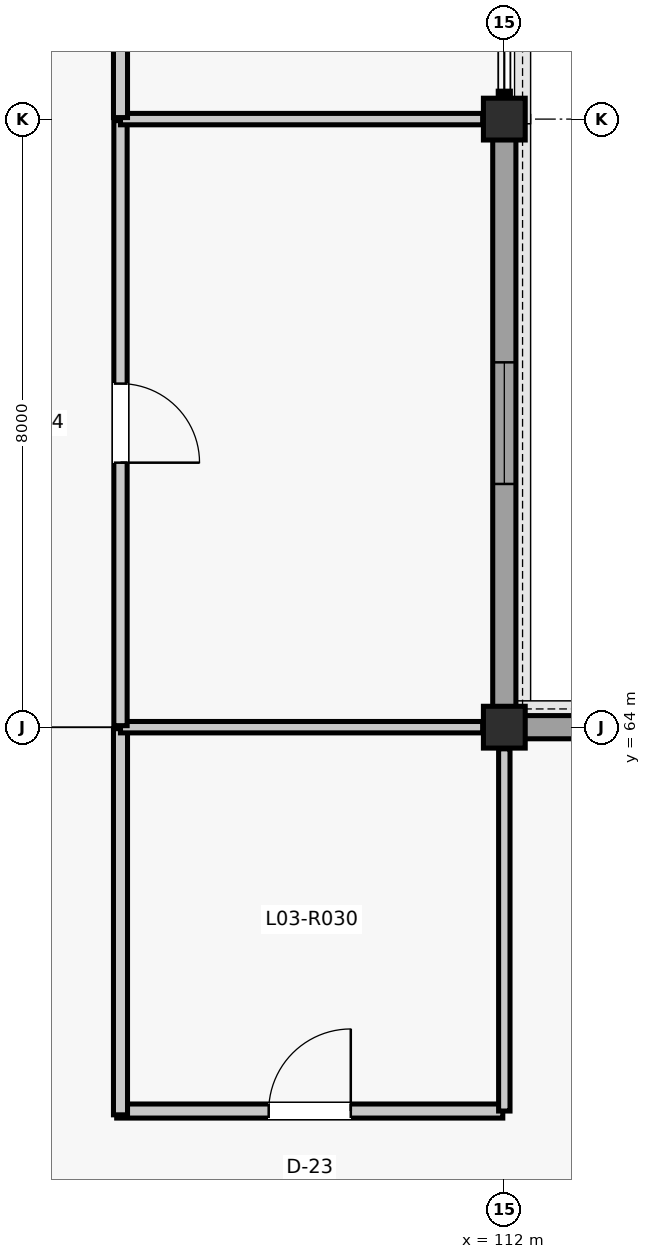
"""IFC4 building model, lengths in metres.
Left out: names, types, materials, properties, quantities, classifications, styles, units other than length and angle.
Written with IfcOpenShell. Run it as: python <this file> out.ifc"""

import sys

from ifc_helpers import new_model, si_unit, direction, frame, frame_2d, origin, origin_2d, place, context, subcontext, project, spatial, rectangle, extrude, element, fill, save


model = new_model("IFC4")
c1 = context("Model", 3, precision=1e-05, world=origin(), true_north=direction((0.0, 1.0)))
c2 = subcontext(c1, "Body", "Model", "MODEL_VIEW")
j1 = project(units=[si_unit("LENGTHUNIT", "METRE"), si_unit("PLANEANGLEUNIT", "RADIAN")], contexts=[c1])
p1 = place(None, origin())
s1 = spatial("IfcSite", under=j1, at=p1, CompositionType="ELEMENT")
p2 = place(p1, origin())
s2 = spatial("IfcBuilding", under=s1, at=p2, CompositionType="ELEMENT")
p3 = place(p2, frame((0.0, 0.0, 13.86)))
s3 = spatial("IfcBuildingStorey", under=s2, at=p3, CompositionType="ELEMENT", Elevation=13.86)
for number, where, z_axis, x_axis in (
    (1, (112.0, 64.0, 0.0), (0.0, 0.0, 1.0), (1.0, 0.0, 0.0)),
    (2, (112.0, 72.0, 0.0), (0.0, 0.0, 1.0), (1.0, 0.0, 0.0)),
):
    element("IfcColumn", number, at=place(p3, frame(where, z_axis=z_axis, x_axis=x_axis)), inside=s3, PredefinedType="COLUMN", context=c2, shape_type="SweptSolid", body=[
        extrude(rectangle(XDim=0.55, YDim=0.55, at=origin_2d()), origin(), (0.0, 0.0, 1.0), 3.96),
    ])
p4 = place(p3, frame((112.0, 64.26, 0.0), z_axis=(0.0, 0.0, 1.0), x_axis=(0.0, 1.0, 0.0)))
e3 = element("IfcWall", 3, at=p4, inside=s3, PredefinedType="SOLIDWALL", context=c2, shape_type="SweptSolid", body=[
    extrude(rectangle(XDim=7.48, YDim=0.305, at=frame_2d((3.74, 0.0))), origin(), (0.0, 0.0, 1.0), 3.364),
])
p5 = place(p4, frame((2.94, 0.0, 0.9)))
e4 = element("IfcOpeningElement", 4, at=p5, cuts=e3, PredefinedType="OPENING", context=c2, shape_type="SweptSolid", body=[
    extrude(rectangle(XDim=1.6, YDim=2.0, at=frame_2d((0.8, 1.0))), frame((0.0, 0.162, 0.0), z_axis=(0.0, -1.0, 0.0), x_axis=(1.0, 0.0, 0.0)), (0.0, 0.0, 1.0), 0.325),
])
p6 = place(p3, frame((112.26, 64.0, 0.0), z_axis=(0.0, 0.0, 1.0), x_axis=(1.0, 0.0, 0.0)))
e5 = element("IfcWall", 5, at=p6, inside=s3, PredefinedType="SOLIDWALL", context=c2, shape_type="SweptSolid", body=[
    extrude(rectangle(XDim=7.48, YDim=0.305, at=frame_2d((3.74, 0.0))), origin(), (0.0, 0.0, 1.0), 3.364),
])
p7 = place(p6, frame((0.746, 0.0, 0.95)))
e6 = element("IfcOpeningElement", 6, at=p7, cuts=e5, PredefinedType="OPENING", context=c2, shape_type="SweptSolid", body=[
    extrude(rectangle(XDim=1.2, YDim=1.8, at=frame_2d((0.6, 0.9))), frame((0.0, 0.162, 0.0), z_axis=(0.0, -1.0, 0.0), x_axis=(1.0, 0.0, 0.0)), (0.0, 0.0, 1.0), 0.325),
])
p8 = place(p6, frame((5.534, 0.0, 0.95)))
e7 = element("IfcOpeningElement", 7, at=p8, cuts=e5, PredefinedType="OPENING", context=c2, shape_type="SweptSolid", body=[
    extrude(rectangle(XDim=1.2, YDim=1.8, at=frame_2d((0.6, 0.9))), frame((0.0, 0.162, 0.0), z_axis=(0.0, -1.0, 0.0), x_axis=(1.0, 0.0, 0.0)), (0.0, 0.0, 1.0), 0.325),
])
p9 = place(p3, frame((106.9, 58.95, 0.0), z_axis=(0.0, 0.0, 1.0), x_axis=(1.0, 0.0, 0.0)))
e8 = element("IfcWall", 8, at=p9, inside=s3, PredefinedType="PARTITIONING", context=c2, shape_type="SweptSolid", body=[
    extrude(rectangle(XDim=5.08, YDim=0.185, at=frame_2d((2.54, 0.0))), origin(), (0.0, 0.0, 1.0), 3.247),
])
p10 = place(p9, frame((2.0, 0.0, 0.0)))
e9 = element("IfcOpeningElement", 9, at=p10, cuts=e8, PredefinedType="OPENING", context=c2, shape_type="SweptSolid", body=[
    extrude(rectangle(XDim=1.08, YDim=2.2, at=frame_2d((0.54, 1.1))), frame((0.0, 0.103, 0.0), z_axis=(0.0, -1.0, 0.0), x_axis=(1.0, 0.0, 0.0)), (0.0, 0.0, 1.0), 0.205),
])
p11 = place(p3, frame((106.95, 58.9, 0.0), z_axis=(0.0, 0.0, 1.0), x_axis=(0.0, 1.0, 0.0)))
e10 = element("IfcWall", 10, at=p11, inside=s3, PredefinedType="PARTITIONING", context=c2, shape_type="SweptSolid", body=[
    extrude(rectangle(XDim=5.08, YDim=0.185, at=frame_2d((2.54, 0.0))), origin(), (0.0, 0.0, 1.0), 3.253),
])
p12 = place(p3, frame((106.95, 64.0, 0.0), z_axis=(0.0, 0.0, 1.0), x_axis=(1.0, 0.0, 0.0)))
e11 = element("IfcWall", 11, at=p12, inside=s3, PredefinedType="PARTITIONING", context=c2, shape_type="SweptSolid", body=[
    extrude(rectangle(XDim=4.765, YDim=0.15, at=frame_2d((2.383, 0.0))), origin(), (0.0, 0.0, 1.0), 3.253),
])
p13 = place(p3, frame((112.0, 58.95, 0.0), z_axis=(0.0, 0.0, 1.0), x_axis=(0.0, 1.0, 0.0)))
e12 = element("IfcWall", 12, at=p13, inside=s3, PredefinedType="PARTITIONING", context=c2, shape_type="SweptSolid", body=[
    extrude(rectangle(XDim=4.765, YDim=0.15, at=frame_2d((2.383, 0.0))), origin(), (0.0, 0.0, 1.0), 3.247),
])
p14 = place(p3, frame((106.95, 64.02, 0.0), z_axis=(0.0, 0.0, 1.0), x_axis=(0.0, 1.0, 0.0)))
e13 = element("IfcWall", 13, at=p14, inside=s3, PredefinedType="PARTITIONING", context=c2, shape_type="SweptSolid", body=[
    extrude(rectangle(XDim=7.96, YDim=0.175, at=frame_2d((3.98, 0.0))), origin(), (0.0, 0.0, 1.0), 3.241),
])
p15 = place(p14, frame((3.46, 0.0, 0.0)))
e14 = element("IfcOpeningElement", 14, at=p15, cuts=e13, PredefinedType="OPENING", context=c2, shape_type="SweptSolid", body=[
    extrude(rectangle(XDim=1.04, YDim=2.18, at=frame_2d((0.52, 1.09))), frame((0.0, 0.097, 0.0), z_axis=(0.0, -1.0, 0.0), x_axis=(1.0, 0.0, 0.0)), (0.0, 0.0, 1.0), 0.195),
])
p16 = place(p3, frame((106.95, 72.0, 0.0), z_axis=(0.0, 0.0, 1.0), x_axis=(1.0, 0.0, 0.0)))
e15 = element("IfcWall", 15, at=p16, inside=s3, PredefinedType="PARTITIONING", context=c2, shape_type="SweptSolid", body=[
    extrude(rectangle(XDim=4.765, YDim=0.15, at=frame_2d((2.383, 0.0))), origin(), (0.0, 0.0, 1.0), 3.241),
])
p17 = place(p3, frame((106.95, 72.02, 0.0), z_axis=(0.0, 0.0, 1.0), x_axis=(0.0, 1.0, 0.0)))
e16 = element("IfcWall", 16, at=p17, inside=s3, PredefinedType="PARTITIONING", context=c2, shape_type="SweptSolid", body=[
    extrude(rectangle(XDim=7.96, YDim=0.185, at=frame_2d((3.98, 0.0))), origin(), (0.0, 0.0, 1.0), 3.241),
])
p18 = place(p17, frame((3.5, 0.0, 0.0)))
e17 = element("IfcOpeningElement", 17, at=p18, cuts=e16, PredefinedType="OPENING", context=c2, shape_type="SweptSolid", body=[
    extrude(rectangle(XDim=0.96, YDim=2.14, at=frame_2d((0.48, 1.07))), frame((0.0, 0.103, 0.0), z_axis=(0.0, -1.0, 0.0), x_axis=(1.0, 0.0, 0.0)), (0.0, 0.0, 1.0), 0.205),
])
p19 = place(p5, origin())
e18 = element("IfcWindow", 18, at=p19, inside=s3, PartitioningType="SINGLE_PANEL", PredefinedType="WINDOW", context=c2, shape_type="SweptSolid", body=[
    extrude(rectangle(XDim=1.6, YDim=2.0, at=frame_2d((0.8, 1.0))), frame((0.0, 0.03, 0.0), z_axis=(0.0, -1.0, 0.0), x_axis=(1.0, 0.0, 0.0)), (0.0, 0.0, 1.0), 0.06),
])
fill(e4, e18)
p20 = place(p10, origin())
e19 = element("IfcDoor", 19, at=p20, inside=s3, OperationType="SINGLE_SWING_RIGHT", PredefinedType="DOOR", context=c2, shape_type="SweptSolid", body=[
    extrude(rectangle(XDim=1.08, YDim=2.2, at=frame_2d((0.54, 1.1))), frame((0.0, 0.025, 0.0), z_axis=(0.0, -1.0, 0.0), x_axis=(1.0, 0.0, 0.0)), (0.0, 0.0, 1.0), 0.05),
])
fill(e9, e19)
p21 = place(p15, frame((1.04, 0.0, 0.0), z_axis=(0.0, 0.0, 1.0), x_axis=(-1.0, 0.0, 0.0)))
e20 = element("IfcDoor", 20, at=p21, inside=s3, OperationType="SINGLE_SWING_LEFT", PredefinedType="DOOR", context=c2, shape_type="SweptSolid", body=[
    extrude(rectangle(XDim=1.04, YDim=2.18, at=frame_2d((0.52, 1.09))), frame((0.0, 0.025, 0.0), z_axis=(0.0, -1.0, 0.0), x_axis=(1.0, 0.0, 0.0)), (0.0, 0.0, 1.0), 0.05),
])
fill(e14, e20)
save(model, sys.argv[1])
